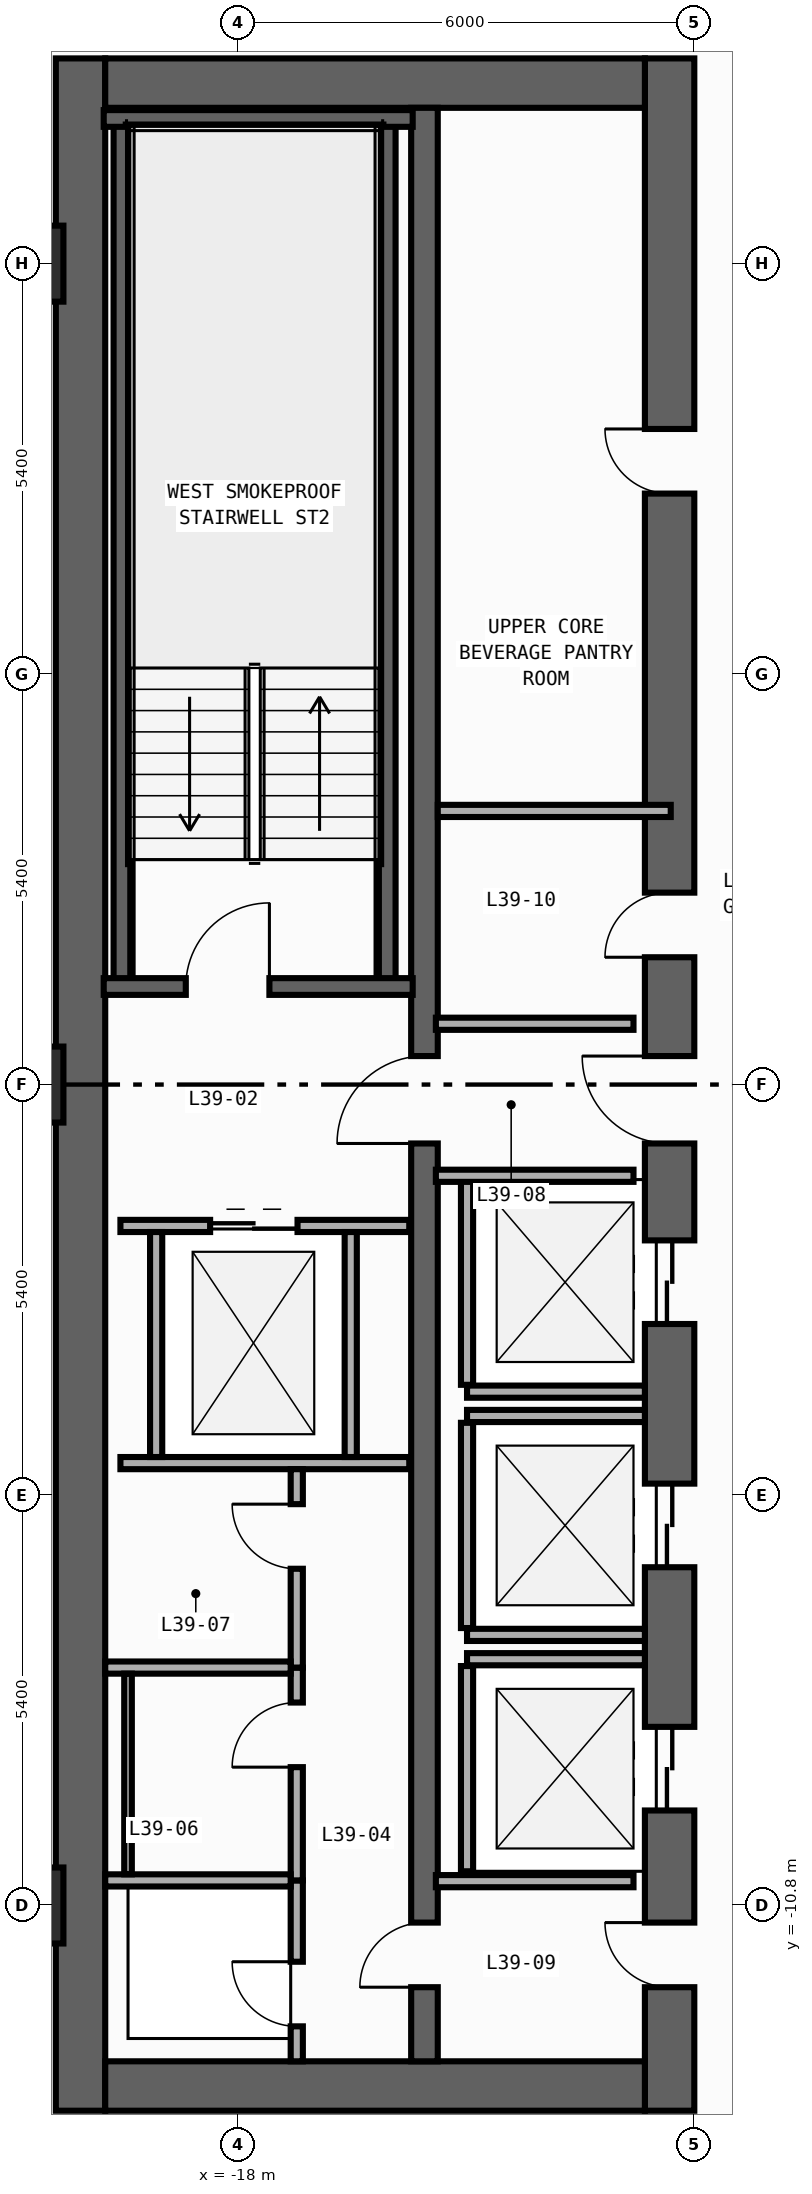
"""IFC4 building model, lengths in metres.
Left out: names, types, materials, properties, quantities, classifications, styles, units other than length and angle.
Written with IfcOpenShell. Run it as: python <this file> out.ifc"""

import sys

from ifc_helpers import new_model, si_unit, direction, frame, frame_2d, origin, origin_2d, place, context, subcontext, project, spatial, rectangle, extrude, element, fill, save


model = new_model("IFC4")
c1 = context("Model", 3, precision=1e-05, world=origin(), true_north=direction((0.0, 1.0)))
c2 = subcontext(c1, "Body", "Model", "MODEL_VIEW")
j1 = project(units=[si_unit("LENGTHUNIT", "METRE"), si_unit("PLANEANGLEUNIT", "RADIAN")], contexts=[c1])
p1 = place(None, origin())
s1 = spatial("IfcSite", under=j1, at=p1, CompositionType="ELEMENT")
p2 = place(p1, origin())
s2 = spatial("IfcBuilding", under=s1, at=p2, CompositionType="ELEMENT")
p3 = place(p2, frame((0.0, 0.0, 172.6)))
s3 = spatial("IfcBuildingStorey", under=s2, at=p3, CompositionType="ELEMENT", Elevation=172.6)
p4 = place(p3, frame((-20.075, -13.5, 0.0), z_axis=(0.0, 0.0, 1.0), x_axis=(0.0, 1.0, 0.0)))
e1 = element("IfcWall", 1, at=p4, inside=s3, PredefinedType="SHEAR", context=c2, shape_type="SweptSolid", body=[
    extrude(rectangle(XDim=27.0, YDim=0.65, at=frame_2d((13.5, 0.0))), origin(), (0.0, 0.0, 1.0), 3.54),
])
p5 = place(p3, frame((-12.325, -13.5, 0.0), z_axis=(0.0, 0.0, 1.0), x_axis=(0.0, 1.0, 0.0)))
e2 = element("IfcWall", 2, at=p5, inside=s3, PredefinedType="SHEAR", context=c2, shape_type="SweptSolid", body=[
    extrude(rectangle(XDim=27.0, YDim=0.65, at=frame_2d((13.5, 0.0))), origin(), (0.0, 0.0, 1.0), 3.54),
])
p6 = place(p5, frame((10.35, 0.0, 0.0)))
e3 = element("IfcOpeningElement", 3, at=p6, cuts=e2, PredefinedType="OPENING", context=c2, shape_type="SweptSolid", body=[
    extrude(rectangle(XDim=1.1, YDim=2.2, at=frame_2d((0.55, 1.1))), frame((0.0, 0.335, 0.0), z_axis=(0.0, -1.0, 0.0), x_axis=(1.0, 0.0, 0.0)), (0.0, 0.0, 1.0), 0.67),
])
p7 = place(p5, frame((7.15, 0.0, 0.0)))
e4 = element("IfcOpeningElement", 4, at=p7, cuts=e2, PredefinedType="OPENING", context=c2, shape_type="SweptSolid", body=[
    extrude(rectangle(XDim=1.1, YDim=2.2, at=frame_2d((0.55, 1.1))), frame((0.0, 0.335, 0.0), z_axis=(0.0, -1.0, 0.0), x_axis=(1.0, 0.0, 0.0)), (0.0, 0.0, 1.0), 0.67),
])
p8 = place(p5, frame((3.95, 0.0, 0.0)))
e5 = element("IfcOpeningElement", 5, at=p8, cuts=e2, PredefinedType="OPENING", context=c2, shape_type="SweptSolid", body=[
    extrude(rectangle(XDim=1.1, YDim=2.2, at=frame_2d((0.55, 1.1))), frame((0.0, 0.335, 0.0), z_axis=(0.0, -1.0, 0.0), x_axis=(1.0, 0.0, 0.0)), (0.0, 0.0, 1.0), 0.67),
])
p9 = place(p5, frame((15.175, 0.0, 0.0)))
e6 = element("IfcOpeningElement", 6, at=p9, cuts=e2, PredefinedType="OPENING", context=c2, shape_type="SweptSolid", body=[
    extrude(rectangle(XDim=0.85, YDim=2.1, at=frame_2d((0.425, 1.05))), frame((0.0, 0.335, 0.0), z_axis=(0.0, -1.0, 0.0), x_axis=(1.0, 0.0, 0.0)), (0.0, 0.0, 1.0), 0.67),
])
p10 = place(p5, frame((21.275, 0.0, 0.0)))
e7 = element("IfcOpeningElement", 7, at=p10, cuts=e2, PredefinedType="OPENING", context=c2, shape_type="SweptSolid", body=[
    extrude(rectangle(XDim=0.85, YDim=2.1, at=frame_2d((0.425, 1.05))), frame((0.0, 0.335, 0.0), z_axis=(0.0, -1.0, 0.0), x_axis=(1.0, 0.0, 0.0)), (0.0, 0.0, 1.0), 0.67),
])
p11 = place(p5, frame((12.725, 0.0, 0.0)))
e8 = element("IfcOpeningElement", 8, at=p11, cuts=e2, PredefinedType="OPENING", context=c2, shape_type="SweptSolid", body=[
    extrude(rectangle(XDim=1.15, YDim=2.2, at=frame_2d((0.575, 1.1))), frame((0.0, 0.335, 0.0), z_axis=(0.0, -1.0, 0.0), x_axis=(1.0, 0.0, 0.0)), (0.0, 0.0, 1.0), 0.67),
])
p12 = place(p5, frame((1.625, 0.0, 0.0)))
e9 = element("IfcOpeningElement", 9, at=p12, cuts=e2, PredefinedType="OPENING", context=c2, shape_type="SweptSolid", body=[
    extrude(rectangle(XDim=0.85, YDim=2.1, at=frame_2d((0.425, 1.05))), frame((0.0, 0.335, 0.0), z_axis=(0.0, -1.0, 0.0), x_axis=(1.0, 0.0, 0.0)), (0.0, 0.0, 1.0), 0.67),
])
for number, where, z_axis, x_axis in (
    (10, (-19.75, -13.175, 0.0), (0.0, 0.0, 1.0), (1.0, 0.0, 0.0)),
    (11, (-19.75, 13.175, 0.0), (0.0, 0.0, 1.0), (1.0, 0.0, 0.0)),
):
    element("IfcWall", number, at=place(p3, frame(where, z_axis=z_axis, x_axis=x_axis)), inside=s3, PredefinedType="SHEAR", context=c2, shape_type="SweptSolid", body=[
        extrude(rectangle(XDim=7.1, YDim=0.65, at=frame_2d((3.55, 0.0))), origin(), (0.0, 0.0, 1.0), 3.54),
    ])
p13 = place(p3, frame((-15.55, -12.85, 0.0), z_axis=(0.0, 0.0, 1.0), x_axis=(0.0, 1.0, 0.0)))
e12 = element("IfcWall", 12, at=p13, inside=s3, PredefinedType="SHEAR", context=c2, shape_type="SweptSolid", body=[
    extrude(rectangle(XDim=25.7, YDim=0.35, at=frame_2d((12.85, 0.0))), origin(), (0.0, 0.0, 1.0), 3.54),
])
p14 = place(p13, frame((12.075, 0.0, 0.0)))
e13 = element("IfcOpeningElement", 13, at=p14, cuts=e12, PredefinedType="OPENING", context=c2, shape_type="SweptSolid", body=[
    extrude(rectangle(XDim=1.15, YDim=2.2, at=frame_2d((0.575, 1.1))), frame((0.0, 0.185, 0.0), z_axis=(0.0, -1.0, 0.0), x_axis=(1.0, 0.0, 0.0)), (0.0, 0.0, 1.0), 0.37),
])
p15 = place(p13, frame((0.975, 0.0, 0.0)))
e14 = element("IfcOpeningElement", 14, at=p15, cuts=e12, PredefinedType="OPENING", context=c2, shape_type="SweptSolid", body=[
    extrude(rectangle(XDim=0.85, YDim=2.1, at=frame_2d((0.425, 1.05))), frame((0.0, 0.185, 0.0), z_axis=(0.0, -1.0, 0.0), x_axis=(1.0, 0.0, 0.0)), (0.0, 0.0, 1.0), 0.37),
])
for number, where, z_axis, x_axis in (
    (15, (-16.04, 1.29, 0.0), (0.0, 0.0, 1.0), (0.0, 1.0, 0.0)),
    (16, (-19.53, 1.29, 0.0), (0.0, 0.0, 1.0), (0.0, 1.0, 0.0)),
):
    element("IfcWall", number, at=place(p3, frame(where, z_axis=z_axis, x_axis=x_axis)), inside=s3, PredefinedType="SHEAR", context=c2, shape_type="SweptSolid", body=[
        extrude(rectangle(XDim=11.42, YDim=0.22, at=frame_2d((5.71, 0.0))), origin(), (0.0, 0.0, 1.0), 3.54),
    ])
p16 = place(p3, frame((-19.77, 12.71, 0.0), z_axis=(0.0, 0.0, 1.0), x_axis=(1.0, 0.0, 0.0)))
e17 = element("IfcWall", 17, at=p16, inside=s3, PredefinedType="SHEAR", context=c2, shape_type="SweptSolid", body=[
    extrude(rectangle(XDim=4.065, YDim=0.22, at=frame_2d((2.032, 0.0))), origin(), (0.0, 0.0, 1.0), 3.54),
])
p17 = place(p3, frame((-19.77, 1.29, 0.0), z_axis=(0.0, 0.0, 1.0), x_axis=(1.0, 0.0, 0.0)))
e18 = element("IfcWall", 18, at=p17, inside=s3, PredefinedType="SHEAR", context=c2, shape_type="SweptSolid", body=[
    extrude(rectangle(XDim=4.065, YDim=0.22, at=frame_2d((2.032, 0.0))), origin(), (0.0, 0.0, 1.0), 3.54),
])
p18 = place(p17, frame((1.08, 0.0, 0.0)))
e19 = element("IfcOpeningElement", 19, at=p18, cuts=e18, PredefinedType="OPENING", context=c2, shape_type="SweptSolid", body=[
    extrude(rectangle(XDim=1.1, YDim=2.2, at=frame_2d((0.55, 1.1))), frame((0.0, 0.12, 0.0), z_axis=(0.0, -1.0, 0.0), x_axis=(1.0, 0.0, 0.0)), (0.0, 0.0, 1.0), 0.24),
])
for number, where, z_axis, x_axis in (
    (20, (-20.8, -10.8, 0.0), (0.0, 0.0, 1.0), (1.0, 0.0, 0.0)),
    (21, (-20.8, 0.0, 0.0), (0.0, 0.0, 1.0), (1.0, 0.0, 0.0)),
    (22, (-20.8, 10.8, 0.0), (0.0, 0.0, 1.0), (1.0, 0.0, 0.0)),
):
    element("IfcColumn", number, at=place(p3, frame(where, z_axis=z_axis, x_axis=x_axis)), inside=s3, PredefinedType="COLUMN", context=c2, shape_type="SweptSolid", body=[
        extrude(rectangle(XDim=1.0, YDim=1.0, at=origin_2d()), origin(), (0.0, 0.0, 1.0), 3.8),
    ])
p19 = place(p3, frame((-14.99, -4.04, 0.0), z_axis=(0.0, 0.0, 1.0), x_axis=(1.0, 0.0, 0.0)))
e23 = element("IfcWall", 23, at=p19, inside=s3, PredefinedType="STANDARD", context=c2, shape_type="SweptSolid", body=[
    extrude(rectangle(XDim=2.34, YDim=0.16, at=frame_2d((1.17, 0.0))), origin(), (0.0, 0.0, 1.0), 3.54),
])
p20 = place(p3, frame((-14.99, -3.95, 0.0), z_axis=(0.0, 0.0, 1.0), x_axis=(0.0, 1.0, 0.0)))
e24 = element("IfcWall", 24, at=p20, inside=s3, PredefinedType="STANDARD", context=c2, shape_type="SweptSolid", body=[
    extrude(rectangle(XDim=2.7, YDim=0.16, at=frame_2d((1.35, 0.0))), origin(), (0.0, 0.0, 1.0), 3.54),
])
for number, where, z_axis, x_axis in (
    (25, (-14.99, -7.24, 0.0), (0.0, 0.0, 1.0), (1.0, 0.0, 0.0)),
    (26, (-14.99, -4.36, 0.0), (0.0, 0.0, 1.0), (1.0, 0.0, 0.0)),
):
    element("IfcWall", number, at=place(p3, frame(where, z_axis=z_axis, x_axis=x_axis)), inside=s3, PredefinedType="STANDARD", context=c2, shape_type="SweptSolid", body=[
        extrude(rectangle(XDim=2.34, YDim=0.16, at=frame_2d((1.17, 0.0))), origin(), (0.0, 0.0, 1.0), 3.54),
    ])
p21 = place(p3, frame((-14.99, -7.15, 0.0), z_axis=(0.0, 0.0, 1.0), x_axis=(0.0, 1.0, 0.0)))
e27 = element("IfcWall", 27, at=p21, inside=s3, PredefinedType="STANDARD", context=c2, shape_type="SweptSolid", body=[
    extrude(rectangle(XDim=2.7, YDim=0.16, at=frame_2d((1.35, 0.0))), origin(), (0.0, 0.0, 1.0), 3.54),
])
p22 = place(p3, frame((-14.99, -7.56, 0.0), z_axis=(0.0, 0.0, 1.0), x_axis=(1.0, 0.0, 0.0)))
e28 = element("IfcWall", 28, at=p22, inside=s3, PredefinedType="STANDARD", context=c2, shape_type="SweptSolid", body=[
    extrude(rectangle(XDim=2.34, YDim=0.16, at=frame_2d((1.17, 0.0))), origin(), (0.0, 0.0, 1.0), 3.54),
])
p23 = place(p3, frame((-14.99, -10.35, 0.0), z_axis=(0.0, 0.0, 1.0), x_axis=(0.0, 1.0, 0.0)))
e29 = element("IfcWall", 29, at=p23, inside=s3, PredefinedType="STANDARD", context=c2, shape_type="SweptSolid", body=[
    extrude(rectangle(XDim=2.7, YDim=0.16, at=frame_2d((1.35, 0.0))), origin(), (0.0, 0.0, 1.0), 3.54),
])
p24 = place(p3, frame((-19.55, -1.86, 0.0), z_axis=(0.0, 0.0, 1.0), x_axis=(1.0, 0.0, 0.0)))
e30 = element("IfcWall", 30, at=p24, inside=s3, PredefinedType="STANDARD", context=c2, shape_type="SweptSolid", body=[
    extrude(rectangle(XDim=3.8, YDim=0.16, at=frame_2d((1.9, 0.0))), origin(), (0.0, 0.0, 1.0), 3.54),
])
p25 = place(p24, frame((1.18, 0.0, 0.0)))
e31 = element("IfcOpeningElement", 31, at=p25, cuts=e30, PredefinedType="OPENING", context=c2, shape_type="SweptSolid", body=[
    extrude(rectangle(XDim=1.15, YDim=2.2, at=frame_2d((0.575, 1.1))), frame((0.0, 0.09, 0.0), z_axis=(0.0, -1.0, 0.0), x_axis=(1.0, 0.0, 0.0)), (0.0, 0.0, 1.0), 0.18),
])
p26 = place(p3, frame((-19.55, -4.98, 0.0), z_axis=(0.0, 0.0, 1.0), x_axis=(1.0, 0.0, 0.0)))
e32 = element("IfcWall", 32, at=p26, inside=s3, PredefinedType="STANDARD", context=c2, shape_type="SweptSolid", body=[
    extrude(rectangle(XDim=3.8, YDim=0.16, at=frame_2d((1.9, 0.0))), origin(), (0.0, 0.0, 1.0), 3.54),
])
for number, where, z_axis, x_axis in (
    (33, (-19.08, -4.9, 0.0), (0.0, 0.0, 1.0), (0.0, 1.0, 0.0)),
    (34, (-16.52, -4.9, 0.0), (0.0, 0.0, 1.0), (0.0, 1.0, 0.0)),
):
    element("IfcWall", number, at=place(p3, frame(where, z_axis=z_axis, x_axis=x_axis)), inside=s3, PredefinedType="STANDARD", context=c2, shape_type="SweptSolid", body=[
        extrude(rectangle(XDim=2.96, YDim=0.16, at=frame_2d((1.48, 0.0))), origin(), (0.0, 0.0, 1.0), 3.54),
    ])
for number, where, z_axis, x_axis in (
    (35, (-15.4, 0.8, 0.0), (0.0, 0.0, 1.0), (1.0, 0.0, 0.0)),
    (36, (-15.4, -1.2, 0.0), (0.0, 0.0, 1.0), (1.0, 0.0, 0.0)),
    (37, (-15.4, -10.48, 0.0), (0.0, 0.0, 1.0), (1.0, 0.0, 0.0)),
):
    element("IfcWall", number, at=place(p3, frame(where, z_axis=z_axis, x_axis=x_axis)), inside=s3, PredefinedType="STANDARD", context=c2, shape_type="SweptSolid", body=[
        extrude(rectangle(XDim=2.6, YDim=0.16, at=frame_2d((1.3, 0.0))), origin(), (0.0, 0.0, 1.0), 3.54),
    ])
p27 = place(p3, frame((-17.23, -12.85, 0.0), z_axis=(0.0, 0.0, 1.0), x_axis=(0.0, 1.0, 0.0)))
e38 = element("IfcWall", 38, at=p27, inside=s3, PredefinedType="PARTITIONING", context=c2, shape_type="SweptSolid", body=[
    extrude(rectangle(XDim=2.38, YDim=0.16, at=frame_2d((1.19, 0.0))), origin(), (0.0, 0.0, 1.0), 3.54),
])
p28 = place(p27, frame((0.46, 0.0, 0.0)))
e39 = element("IfcOpeningElement", 39, at=p28, cuts=e38, PredefinedType="OPENING", context=c2, shape_type="SweptSolid", body=[
    extrude(rectangle(XDim=0.85, YDim=2.1, at=frame_2d((0.425, 1.05))), frame((0.0, 0.09, 0.0), z_axis=(0.0, -1.0, 0.0), x_axis=(1.0, 0.0, 0.0)), (0.0, 0.0, 1.0), 0.18),
])
p29 = place(p3, frame((-17.23, -10.47, 0.0), z_axis=(0.0, 0.0, 1.0), x_axis=(0.0, 1.0, 0.0)))
e40 = element("IfcWall", 40, at=p29, inside=s3, PredefinedType="PARTITIONING", context=c2, shape_type="SweptSolid", body=[
    extrude(rectangle(XDim=2.8, YDim=0.16, at=frame_2d((1.4, 0.0))), origin(), (0.0, 0.0, 1.0), 3.54),
])
p30 = place(p29, frame((1.49, 0.0, 0.0)))
e41 = element("IfcOpeningElement", 41, at=p30, cuts=e40, PredefinedType="OPENING", context=c2, shape_type="SweptSolid", body=[
    extrude(rectangle(XDim=0.85, YDim=2.1, at=frame_2d((0.425, 1.05))), frame((0.0, 0.09, 0.0), z_axis=(0.0, -1.0, 0.0), x_axis=(1.0, 0.0, 0.0)), (0.0, 0.0, 1.0), 0.18),
])
p31 = place(p3, frame((-17.23, -7.67, 0.0), z_axis=(0.0, 0.0, 1.0), x_axis=(0.0, 1.0, 0.0)))
e42 = element("IfcWall", 42, at=p31, inside=s3, PredefinedType="PARTITIONING", context=c2, shape_type="SweptSolid", body=[
    extrude(rectangle(XDim=2.61, YDim=0.16, at=frame_2d((1.305, 0.0))), origin(), (0.0, 0.0, 1.0), 3.54),
])
p32 = place(p31, frame((1.3, 0.0, 0.0)))
e43 = element("IfcOpeningElement", 43, at=p32, cuts=e42, PredefinedType="OPENING", context=c2, shape_type="SweptSolid", body=[
    extrude(rectangle(XDim=0.85, YDim=2.1, at=frame_2d((0.425, 1.05))), frame((0.0, 0.09, 0.0), z_axis=(0.0, -1.0, 0.0), x_axis=(1.0, 0.0, 0.0)), (0.0, 0.0, 1.0), 0.18),
])
for number, where, z_axis, x_axis in (
    (44, (-19.75, -10.47, 0.0), (0.0, 0.0, 1.0), (1.0, 0.0, 0.0)),
    (45, (-19.75, -7.67, 0.0), (0.0, 0.0, 1.0), (1.0, 0.0, 0.0)),
):
    element("IfcWall", number, at=place(p3, frame(where, z_axis=z_axis, x_axis=x_axis)), inside=s3, PredefinedType="PARTITIONING", context=c2, shape_type="SweptSolid", body=[
        extrude(rectangle(XDim=2.44, YDim=0.16, at=frame_2d((1.22, 0.0))), origin(), (0.0, 0.0, 1.0), 3.54),
    ])
p33 = place(p3, frame((-15.375, 3.6, 0.0), z_axis=(0.0, 0.0, 1.0), x_axis=(1.0, 0.0, 0.0)))
e46 = element("IfcWall", 46, at=p33, inside=s3, PredefinedType="PARTITIONING", context=c2, shape_type="SweptSolid", body=[
    extrude(rectangle(XDim=3.065, YDim=0.16, at=frame_2d((1.532, 0.0))), origin(), (0.0, 0.0, 1.0), 3.54),
])
p34 = place(p3, frame((-19.45, -10.39, 0.0), z_axis=(0.0, 0.0, 1.0), x_axis=(0.0, 1.0, 0.0)))
e47 = element("IfcWall", 47, at=p34, inside=s3, PredefinedType="PARTITIONING", context=c2, shape_type="SweptSolid", body=[
    extrude(rectangle(XDim=2.64, YDim=0.1, at=frame_2d((1.32, 0.0))), origin(), (0.0, 0.0, 1.0), 3.54),
])
p35 = place(p18, origin())
e48 = element("IfcDoor", 48, at=p35, inside=s3, OperationType="SINGLE_SWING_RIGHT", PredefinedType="DOOR", context=c2, shape_type="SweptSolid", body=[
    extrude(rectangle(XDim=1.1, YDim=2.2, at=frame_2d((0.55, 1.1))), frame((0.0, 0.025, 0.0), z_axis=(0.0, -1.0, 0.0), x_axis=(1.0, 0.0, 0.0)), (0.0, 0.0, 1.0), 0.05),
])
fill(e19, e48)
p36 = place(p6, origin())
e49 = element("IfcDoor", 49, at=p36, inside=s3, OperationType="DOUBLE_DOOR_SLIDING", PredefinedType="DOOR", context=c2, shape_type="SweptSolid", body=[
    extrude(rectangle(XDim=1.1, YDim=2.2, at=frame_2d((0.55, 1.1))), frame((0.0, 0.025, 0.0), z_axis=(0.0, -1.0, 0.0), x_axis=(1.0, 0.0, 0.0)), (0.0, 0.0, 1.0), 0.05),
])
fill(e3, e49)
p37 = place(p7, origin())
e50 = element("IfcDoor", 50, at=p37, inside=s3, OperationType="DOUBLE_DOOR_SLIDING", PredefinedType="DOOR", context=c2, shape_type="SweptSolid", body=[
    extrude(rectangle(XDim=1.1, YDim=2.2, at=frame_2d((0.55, 1.1))), frame((0.0, 0.025, 0.0), z_axis=(0.0, -1.0, 0.0), x_axis=(1.0, 0.0, 0.0)), (0.0, 0.0, 1.0), 0.05),
])
fill(e4, e50)
p38 = place(p8, origin())
e51 = element("IfcDoor", 51, at=p38, inside=s3, OperationType="DOUBLE_DOOR_SLIDING", PredefinedType="DOOR", context=c2, shape_type="SweptSolid", body=[
    extrude(rectangle(XDim=1.1, YDim=2.2, at=frame_2d((0.55, 1.1))), frame((0.0, 0.025, 0.0), z_axis=(0.0, -1.0, 0.0), x_axis=(1.0, 0.0, 0.0)), (0.0, 0.0, 1.0), 0.05),
])
fill(e5, e51)
p39 = place(p9, origin())
e52 = element("IfcDoor", 52, at=p39, inside=s3, OperationType="SINGLE_SWING_LEFT", PredefinedType="DOOR", context=c2, shape_type="SweptSolid", body=[
    extrude(rectangle(XDim=0.85, YDim=2.1, at=frame_2d((0.425, 1.05))), frame((0.0, 0.025, 0.0), z_axis=(0.0, -1.0, 0.0), x_axis=(1.0, 0.0, 0.0)), (0.0, 0.0, 1.0), 0.05),
])
fill(e6, e52)
p40 = place(p10, origin())
e53 = element("IfcDoor", 53, at=p40, inside=s3, OperationType="SINGLE_SWING_RIGHT", PredefinedType="DOOR", context=c2, shape_type="SweptSolid", body=[
    extrude(rectangle(XDim=0.85, YDim=2.1, at=frame_2d((0.425, 1.05))), frame((0.0, 0.025, 0.0), z_axis=(0.0, -1.0, 0.0), x_axis=(1.0, 0.0, 0.0)), (0.0, 0.0, 1.0), 0.05),
])
fill(e7, e53)
p41 = place(p11, origin())
e54 = element("IfcDoor", 54, at=p41, inside=s3, OperationType="SINGLE_SWING_RIGHT", PredefinedType="DOOR", context=c2, shape_type="SweptSolid", body=[
    extrude(rectangle(XDim=1.15, YDim=2.2, at=frame_2d((0.575, 1.1))), frame((0.0, 0.025, 0.0), z_axis=(0.0, -1.0, 0.0), x_axis=(1.0, 0.0, 0.0)), (0.0, 0.0, 1.0), 0.05),
])
fill(e8, e54)
p42 = place(p14, origin())
e55 = element("IfcDoor", 55, at=p42, inside=s3, OperationType="SINGLE_SWING_LEFT", PredefinedType="DOOR", context=c2, shape_type="SweptSolid", body=[
    extrude(rectangle(XDim=1.15, YDim=2.2, at=frame_2d((0.575, 1.1))), frame((0.0, 0.025, 0.0), z_axis=(0.0, -1.0, 0.0), x_axis=(1.0, 0.0, 0.0)), (0.0, 0.0, 1.0), 0.05),
])
fill(e13, e55)
p43 = place(p12, origin())
e56 = element("IfcDoor", 56, at=p43, inside=s3, OperationType="SINGLE_SWING_RIGHT", PredefinedType="DOOR", context=c2, shape_type="SweptSolid", body=[
    extrude(rectangle(XDim=0.85, YDim=2.1, at=frame_2d((0.425, 1.05))), frame((0.0, 0.025, 0.0), z_axis=(0.0, -1.0, 0.0), x_axis=(1.0, 0.0, 0.0)), (0.0, 0.0, 1.0), 0.05),
])
fill(e9, e56)
p44 = place(p15, origin())
e57 = element("IfcDoor", 57, at=p44, inside=s3, OperationType="SINGLE_SWING_LEFT", PredefinedType="DOOR", context=c2, shape_type="SweptSolid", body=[
    extrude(rectangle(XDim=0.85, YDim=2.1, at=frame_2d((0.425, 1.05))), frame((0.0, 0.025, 0.0), z_axis=(0.0, -1.0, 0.0), x_axis=(1.0, 0.0, 0.0)), (0.0, 0.0, 1.0), 0.05),
])
fill(e14, e57)
p45 = place(p25, origin())
e58 = element("IfcDoor", 58, at=p45, inside=s3, OperationType="DOUBLE_DOOR_SLIDING", PredefinedType="DOOR", context=c2, shape_type="SweptSolid", body=[
    extrude(rectangle(XDim=1.15, YDim=2.2, at=frame_2d((0.575, 1.1))), frame((0.0, 0.025, 0.0), z_axis=(0.0, -1.0, 0.0), x_axis=(1.0, 0.0, 0.0)), (0.0, 0.0, 1.0), 0.05),
])
fill(e31, e58)
p46 = place(p28, origin())
e59 = element("IfcDoor", 59, at=p46, inside=s3, OperationType="SINGLE_SWING_RIGHT", PredefinedType="DOOR", context=c2, shape_type="SweptSolid", body=[
    extrude(rectangle(XDim=0.85, YDim=2.1, at=frame_2d((0.425, 1.05))), frame((0.0, 0.025, 0.0), z_axis=(0.0, -1.0, 0.0), x_axis=(1.0, 0.0, 0.0)), (0.0, 0.0, 1.0), 0.05),
])
fill(e39, e59)
p47 = place(p30, origin())
e60 = element("IfcDoor", 60, at=p47, inside=s3, OperationType="SINGLE_SWING_LEFT", PredefinedType="DOOR", context=c2, shape_type="SweptSolid", body=[
    extrude(rectangle(XDim=0.85, YDim=2.1, at=frame_2d((0.425, 1.05))), frame((0.0, 0.025, 0.0), z_axis=(0.0, -1.0, 0.0), x_axis=(1.0, 0.0, 0.0)), (0.0, 0.0, 1.0), 0.05),
])
fill(e41, e60)
p48 = place(p32, origin())
e61 = element("IfcDoor", 61, at=p48, inside=s3, OperationType="SINGLE_SWING_RIGHT", PredefinedType="DOOR", context=c2, shape_type="SweptSolid", body=[
    extrude(rectangle(XDim=0.85, YDim=2.1, at=frame_2d((0.425, 1.05))), frame((0.0, 0.025, 0.0), z_axis=(0.0, -1.0, 0.0), x_axis=(1.0, 0.0, 0.0)), (0.0, 0.0, 1.0), 0.05),
])
fill(e43, e61)
save(model, sys.argv[1])
